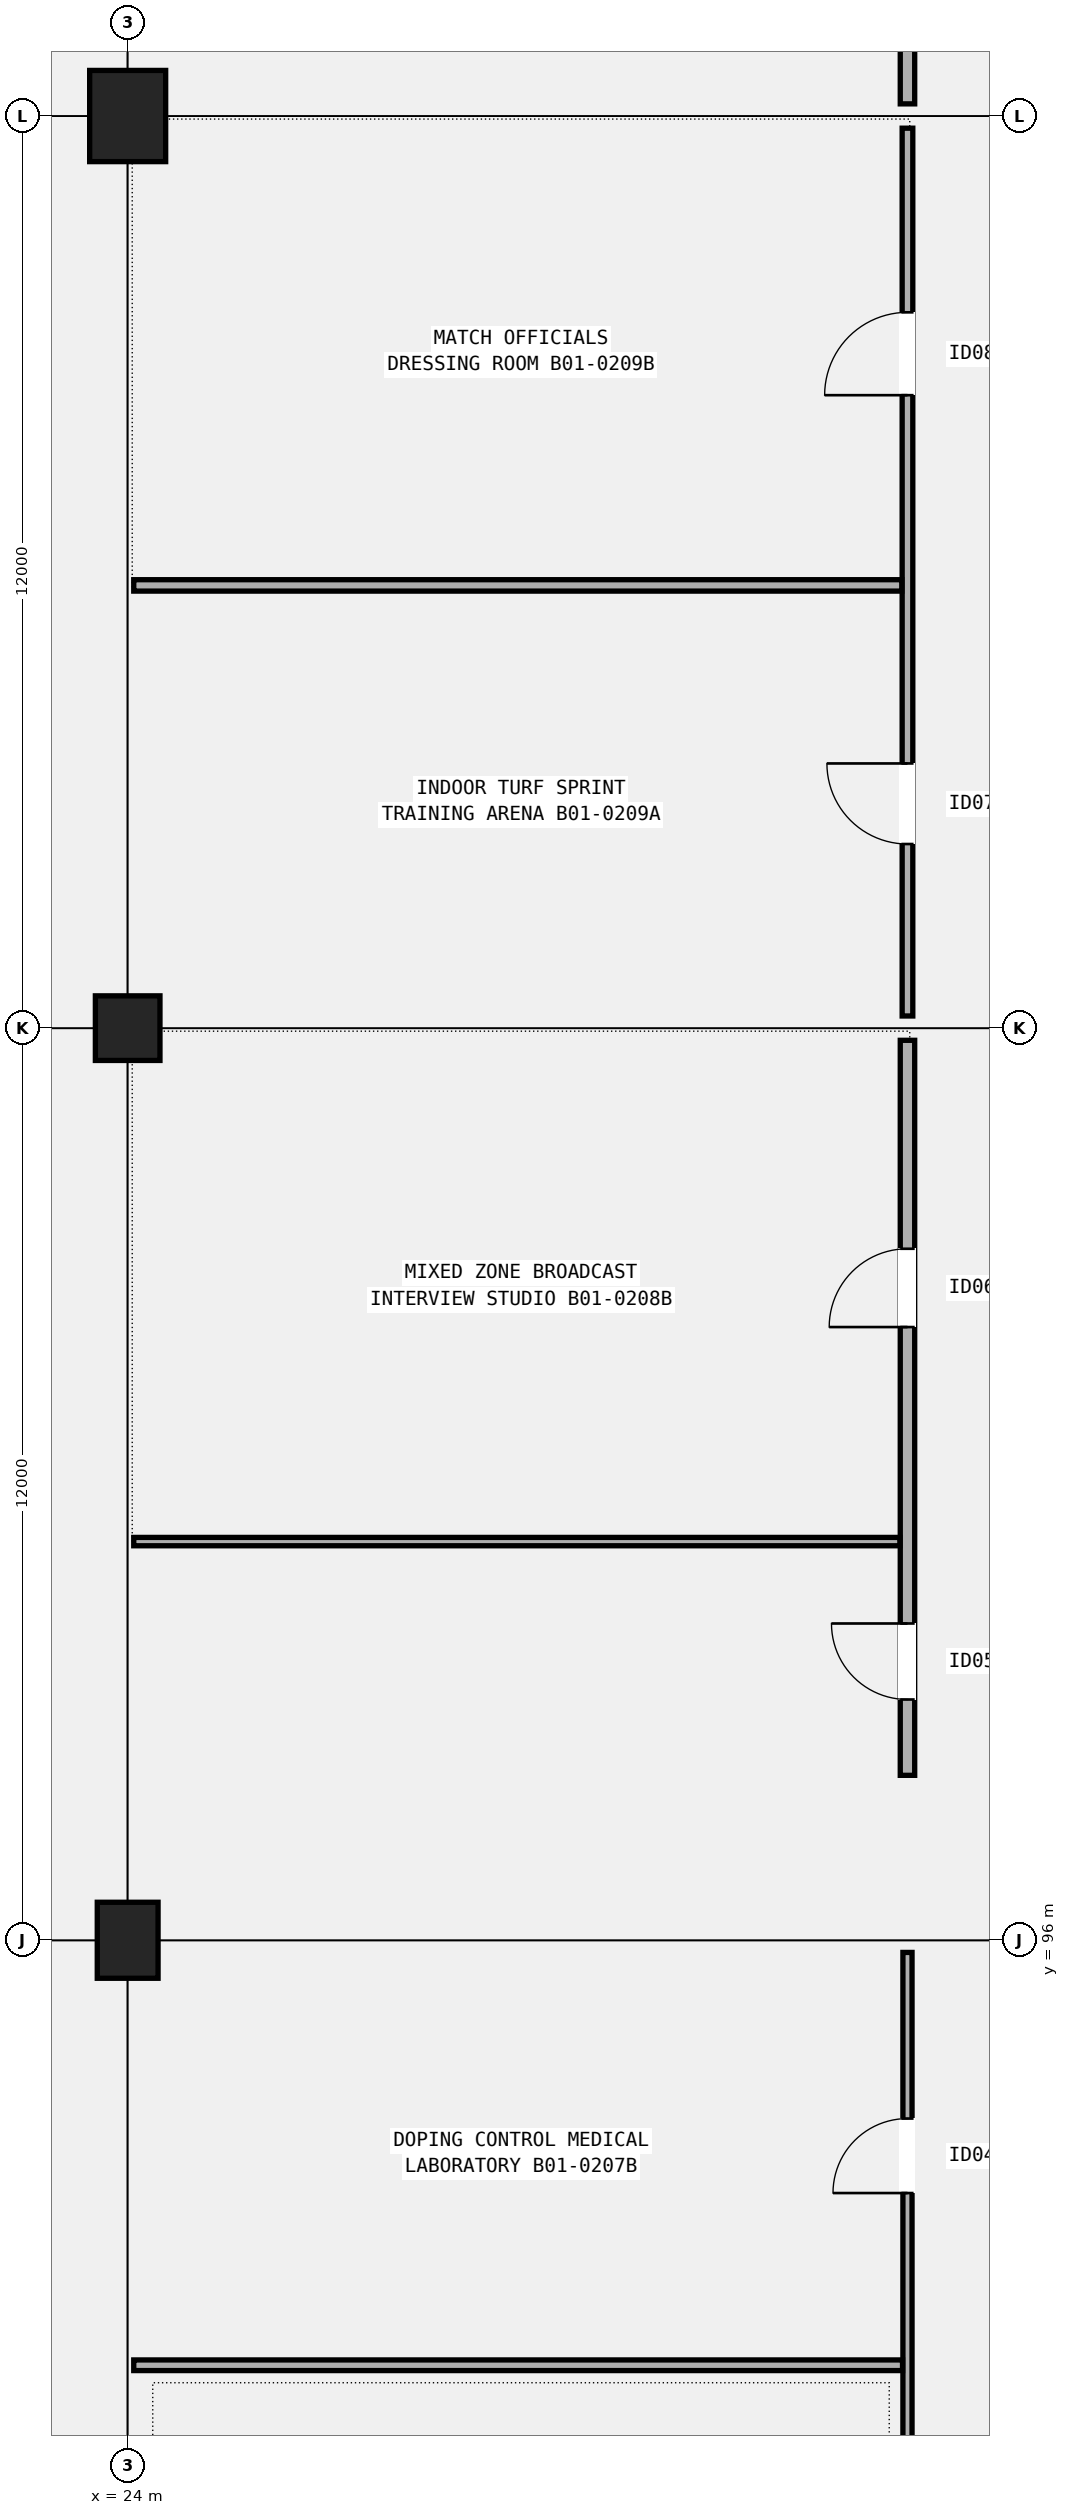
"""IFC4 building model, lengths in metres.
Left out: names, types, materials, properties, quantities, classifications, styles, units other than length and angle.
Written with IfcOpenShell. Run it as: python <this file> out.ifc"""

import sys

from ifc_helpers import new_model, si_unit, direction, frame, frame_2d, origin, origin_2d, place, context, subcontext, project, spatial, rectangle, circle, extrude, element, fill, save


model = new_model("IFC4")
c1 = context("Model", 3, precision=1e-05, world=origin(), true_north=direction((0.0, 1.0)))
c2 = subcontext(c1, "Body", "Model", "MODEL_VIEW")
j1 = project(units=[si_unit("LENGTHUNIT", "METRE"), si_unit("PLANEANGLEUNIT", "RADIAN")], contexts=[c1])
p1 = place(None, origin())
s1 = spatial("IfcSite", under=j1, at=p1, CompositionType="ELEMENT")
p2 = place(p1, origin())
s2 = spatial("IfcBuilding", under=s1, at=p2, CompositionType="ELEMENT")
p3 = place(p2, frame((0.0, 0.0, -4.8)))
s3 = spatial("IfcBuildingStorey", under=s2, at=p3, CompositionType="ELEMENT", Elevation=-4.8)
p4 = place(p3, frame((24.0, 96.0, 0.0), z_axis=(0.0, 0.0, 1.0), x_axis=(1.0, 0.0, 0.0)))
e1 = element("IfcColumn", 1, at=p4, inside=s3, PredefinedType="COLUMN", context=c2, shape_type="SweptSolid", body=[
    extrude(rectangle(XDim=0.8, YDim=1.0, at=origin_2d()), origin(), (0.0, 0.0, 1.0), 4.8),
])
p5 = place(p3, frame((24.0, 108.0, 0.0), z_axis=(0.0, 0.0, 1.0), x_axis=(1.0, 0.0, 0.0)))
e2 = element("IfcColumn", 2, at=p5, inside=s3, PredefinedType="COLUMN", context=c2, shape_type="SweptSolid", body=[
    extrude(circle(Radius=0.425, at=origin_2d()), origin(), (0.0, 0.0, 1.0), 4.8),
])
p6 = place(p3, frame((24.0, 120.0, 0.0), z_axis=(0.0, 0.0, 1.0), x_axis=(1.0, 0.0, 0.0)))
e3 = element("IfcColumn", 3, at=p6, inside=s3, PredefinedType="COLUMN", context=c2, shape_type="SweptSolid", body=[
    extrude(rectangle(XDim=1.0, YDim=1.2, at=origin_2d()), origin(), (0.0, 0.0, 1.0), 4.8),
])
p7 = place(p3, frame((34.26, 84.16, 0.0), z_axis=(0.0, 0.0, 1.0), x_axis=(0.0, 1.0, 0.0)))
e4 = element("IfcWall", 4, at=p7, inside=s3, PredefinedType="PARTITIONING", context=c2, shape_type="SweptSolid", body=[
    extrude(rectangle(XDim=11.68, YDim=0.12, at=frame_2d((5.84, 0.0))), origin(), (0.0, 0.0, 1.0), 3.92),
])
p8 = place(p7, frame((2.609, 0.0, 0.0)))
e5 = element("IfcOpeningElement", 5, at=p8, cuts=e4, PredefinedType="OPENING", context=c2, shape_type="SweptSolid", body=[
    extrude(rectangle(XDim=0.95, YDim=2.12, at=frame_2d((0.475, 1.06))), frame((0.0, 0.07, 0.0), z_axis=(0.0, -1.0, 0.0), x_axis=(1.0, 0.0, 0.0)), (0.0, 0.0, 1.0), 0.14),
])
p9 = place(p7, frame((8.514, 0.0, 0.0)))
e6 = element("IfcOpeningElement", 6, at=p9, cuts=e4, PredefinedType="OPENING", context=c2, shape_type="SweptSolid", body=[
    extrude(rectangle(XDim=0.98, YDim=2.1, at=frame_2d((0.49, 1.05))), frame((0.0, 0.07, 0.0), z_axis=(0.0, -1.0, 0.0), x_axis=(1.0, 0.0, 0.0)), (0.0, 0.0, 1.0), 0.14),
])
p10 = place(p3, frame((24.08, 90.409, 0.0), z_axis=(0.0, 0.0, 1.0), x_axis=(1.0, 0.0, 0.0)))
e7 = element("IfcWall", 7, at=p10, inside=s3, PredefinedType="PARTITIONING", context=c2, shape_type="SweptSolid", body=[
    extrude(rectangle(XDim=10.115, YDim=0.14, at=frame_2d((5.058, 0.0))), origin(), (0.0, 0.0, 1.0), 3.92),
])
p11 = place(p3, frame((34.26, 98.17, 0.0), z_axis=(0.0, 0.0, 1.0), x_axis=(0.0, 1.0, 0.0)))
e8 = element("IfcWall", 8, at=p11, inside=s3, PredefinedType="PARTITIONING", context=c2, shape_type="SweptSolid", body=[
    extrude(rectangle(XDim=9.67, YDim=0.19, at=frame_2d((4.835, 0.0))), origin(), (0.0, 0.0, 1.0), 3.92),
])
p12 = place(p11, frame((0.998, 0.0, 0.0)))
e9 = element("IfcOpeningElement", 9, at=p12, cuts=e8, PredefinedType="OPENING", context=c2, shape_type="SweptSolid", body=[
    extrude(rectangle(XDim=1.0, YDim=2.14, at=frame_2d((0.5, 1.07))), frame((0.0, 0.105, 0.0), z_axis=(0.0, -1.0, 0.0), x_axis=(1.0, 0.0, 0.0)), (0.0, 0.0, 1.0), 0.21),
])
p13 = place(p11, frame((5.897, 0.0, 0.0)))
e10 = element("IfcOpeningElement", 10, at=p13, cuts=e8, PredefinedType="OPENING", context=c2, shape_type="SweptSolid", body=[
    extrude(rectangle(XDim=1.03, YDim=2.12, at=frame_2d((0.515, 1.06))), frame((0.0, 0.105, 0.0), z_axis=(0.0, -1.0, 0.0), x_axis=(1.0, 0.0, 0.0)), (0.0, 0.0, 1.0), 0.21),
])
p14 = place(p3, frame((24.08, 101.245, 0.0), z_axis=(0.0, 0.0, 1.0), x_axis=(1.0, 0.0, 0.0)))
e11 = element("IfcWall", 11, at=p14, inside=s3, PredefinedType="PARTITIONING", context=c2, shape_type="SweptSolid", body=[
    extrude(rectangle(XDim=10.08, YDim=0.11, at=frame_2d((5.04, 0.0))), origin(), (0.0, 0.0, 1.0), 3.92),
])
p15 = place(p3, frame((34.26, 108.16, 0.0), z_axis=(0.0, 0.0, 1.0), x_axis=(0.0, 1.0, 0.0)))
e12 = element("IfcWall", 12, at=p15, inside=s3, PredefinedType="PARTITIONING", context=c2, shape_type="SweptSolid", body=[
    extrude(rectangle(XDim=11.68, YDim=0.14, at=frame_2d((5.84, 0.0))), origin(), (0.0, 0.0, 1.0), 3.92),
])
p16 = place(p15, frame((2.262, 0.0, 0.0)))
e13 = element("IfcOpeningElement", 13, at=p16, cuts=e12, PredefinedType="OPENING", context=c2, shape_type="SweptSolid", body=[
    extrude(rectangle(XDim=1.06, YDim=2.15, at=frame_2d((0.53, 1.075))), frame((0.0, 0.08, 0.0), z_axis=(0.0, -1.0, 0.0), x_axis=(1.0, 0.0, 0.0)), (0.0, 0.0, 1.0), 0.16),
])
p17 = place(p15, frame((8.167, 0.0, 0.0)))
e14 = element("IfcOpeningElement", 14, at=p17, cuts=e12, PredefinedType="OPENING", context=c2, shape_type="SweptSolid", body=[
    extrude(rectangle(XDim=1.09, YDim=2.16, at=frame_2d((0.545, 1.08))), frame((0.0, 0.08, 0.0), z_axis=(0.0, -1.0, 0.0), x_axis=(1.0, 0.0, 0.0)), (0.0, 0.0, 1.0), 0.16),
])
p18 = place(p3, frame((24.08, 113.825, 0.0), z_axis=(0.0, 0.0, 1.0), x_axis=(1.0, 0.0, 0.0)))
e15 = element("IfcWall", 15, at=p18, inside=s3, PredefinedType="PARTITIONING", context=c2, shape_type="SweptSolid", body=[
    extrude(rectangle(XDim=10.105, YDim=0.15, at=frame_2d((5.052, 0.0))), origin(), (0.0, 0.0, 1.0), 3.92),
])
p19 = place(p3, frame((34.26, 120.16, 0.0), z_axis=(0.0, 0.0, 1.0), x_axis=(0.0, 1.0, 0.0)))
e16 = element("IfcWall", 16, at=p19, inside=s3, PredefinedType="PARTITIONING", context=c2, shape_type="SweptSolid", body=[
    extrude(rectangle(XDim=11.68, YDim=0.19, at=frame_2d((5.84, 0.0))), origin(), (0.0, 0.0, 1.0), 3.92),
])
p20 = place(p19, frame((5.28, 0.0, 0.0)))
e17 = element("IfcOpeningElement", 17, at=p20, cuts=e16, PredefinedType="OPENING", context=c2, shape_type="SweptSolid", body=[
    extrude(rectangle(XDim=1.12, YDim=2.18, at=frame_2d((0.56, 1.09))), frame((0.0, 0.105, 0.0), z_axis=(0.0, -1.0, 0.0), x_axis=(1.0, 0.0, 0.0)), (0.0, 0.0, 1.0), 0.21),
])
p21 = place(p9, origin())
e18 = element("IfcDoor", 18, at=p21, inside=s3, OperationType="SINGLE_SWING_LEFT", PredefinedType="DOOR", context=c2, shape_type="SweptSolid", body=[
    extrude(rectangle(XDim=0.98, YDim=2.1, at=frame_2d((0.49, 1.05))), frame((0.0, 0.025, 0.0), z_axis=(0.0, -1.0, 0.0), x_axis=(1.0, 0.0, 0.0)), (0.0, 0.0, 1.0), 0.05),
])
fill(e6, e18)
p22 = place(p12, origin())
e19 = element("IfcDoor", 19, at=p22, inside=s3, OperationType="SINGLE_SWING_RIGHT", PredefinedType="DOOR", context=c2, shape_type="SweptSolid", body=[
    extrude(rectangle(XDim=1.0, YDim=2.14, at=frame_2d((0.5, 1.07))), frame((0.0, 0.025, 0.0), z_axis=(0.0, -1.0, 0.0), x_axis=(1.0, 0.0, 0.0)), (0.0, 0.0, 1.0), 0.05),
])
fill(e9, e19)
p23 = place(p13, origin())
e20 = element("IfcDoor", 20, at=p23, inside=s3, OperationType="SINGLE_SWING_LEFT", PredefinedType="DOOR", context=c2, shape_type="SweptSolid", body=[
    extrude(rectangle(XDim=1.03, YDim=2.12, at=frame_2d((0.515, 1.06))), frame((0.0, 0.025, 0.0), z_axis=(0.0, -1.0, 0.0), x_axis=(1.0, 0.0, 0.0)), (0.0, 0.0, 1.0), 0.05),
])
fill(e10, e20)
p24 = place(p16, origin())
e21 = element("IfcDoor", 21, at=p24, inside=s3, OperationType="SINGLE_SWING_RIGHT", PredefinedType="DOOR", context=c2, shape_type="SweptSolid", body=[
    extrude(rectangle(XDim=1.06, YDim=2.15, at=frame_2d((0.53, 1.075))), frame((0.0, 0.025, 0.0), z_axis=(0.0, -1.0, 0.0), x_axis=(1.0, 0.0, 0.0)), (0.0, 0.0, 1.0), 0.05),
])
fill(e13, e21)
p25 = place(p17, origin())
e22 = element("IfcDoor", 22, at=p25, inside=s3, OperationType="SINGLE_SWING_LEFT", PredefinedType="DOOR", context=c2, shape_type="SweptSolid", body=[
    extrude(rectangle(XDim=1.09, YDim=2.16, at=frame_2d((0.545, 1.08))), frame((0.0, 0.025, 0.0), z_axis=(0.0, -1.0, 0.0), x_axis=(1.0, 0.0, 0.0)), (0.0, 0.0, 1.0), 0.05),
])
fill(e14, e22)
save(model, sys.argv[1])
